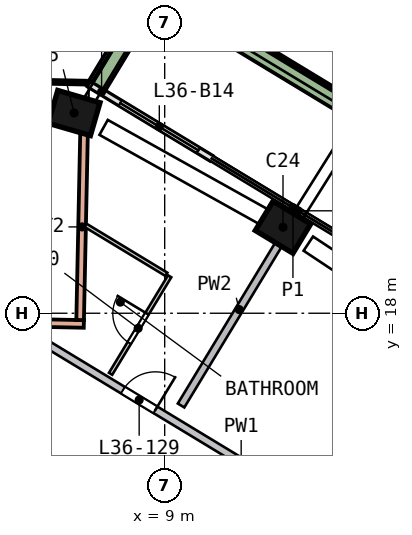
"""IFC4 building model, lengths in metres.
Left out: names, types, materials, properties, quantities, classifications, styles, units other than length and angle.
Written with IfcOpenShell. Run it as: python <this file> out.ifc"""

import sys

from ifc_helpers import new_model, si_unit, direction, frame, frame_2d, origin, origin_2d, place, context, subcontext, project, spatial, rectangle, extrude, element, fill, save


model = new_model("IFC4")
c1 = context("Model", 3, precision=1e-05, world=origin(), true_north=direction((0.0, 1.0)))
c2 = subcontext(c1, "Body", "Model", "MODEL_VIEW")
j1 = project(units=[si_unit("LENGTHUNIT", "METRE"), si_unit("PLANEANGLEUNIT", "RADIAN")], contexts=[c1])
p1 = place(None, origin())
s1 = spatial("IfcSite", under=j1, at=p1, CompositionType="ELEMENT")
p2 = place(p1, origin())
s2 = spatial("IfcBuilding", under=s1, at=p2, CompositionType="ELEMENT")
p3 = place(p2, frame((0.0, 0.0, 150.5)))
s3 = spatial("IfcBuildingStorey", under=s2, at=p3, CompositionType="ELEMENT", Elevation=150.5)
p4 = place(p3, frame((12.23, 20.194, 0.0), z_axis=(-0.096507973, 0.057418061, 0.993674684), x_axis=(-0.849621729, 0.515299129, -0.112293037)))
e1 = element("IfcColumn", 1, at=p4, inside=s3, PredefinedType="COLUMN", context=c2, shape_type="SweptSolid", body=[
    extrude(rectangle(XDim=1.15, YDim=0.9, at=origin_2d()), origin(), (0.0, 0.0, 1.0), 3.21),
])
p5 = place(p3, frame((6.75, 23.232, 0.0), z_axis=(-0.11077004, 0.031170704, 0.993357129), x_axis=(0.953900326, -0.277188554, 0.115068122)))
e2 = element("IfcColumn", 2, at=p5, inside=s3, PredefinedType="COLUMN", context=c2, shape_type="SweptSolid", body=[
    extrude(rectangle(XDim=1.15, YDim=0.9, at=origin_2d()), origin(), (0.0, 0.0, 1.0), 3.211),
])
p6 = place(p3, frame((10.227, 22.079, 0.0), z_axis=(0.0, 0.0, 1.0), x_axis=(-0.85536042, 0.51803335, 0.0)))
e3 = element("IfcWall", 3, at=p6, inside=s3, PredefinedType="SOLIDWALL", context=c2, shape_type="SweptSolid", body=[
    extrude(rectangle(XDim=3.75, YDim=0.15, at=frame_2d((1.875, 0.0))), origin(), (0.0, 0.0, 1.0), 2.475),
])
p7 = place(p6, frame((0.4, 0.0, 0.0)))
e4 = element("IfcOpeningElement", 4, at=p7, cuts=e3, PredefinedType="OPENING", context=c2, shape_type="SweptSolid", body=[
    extrude(rectangle(XDim=2.4, YDim=2.4, at=frame_2d((1.2, 1.2))), frame((0.0, 0.085, 0.0), z_axis=(0.0, -1.0, 0.0), x_axis=(1.0, 0.0, 0.0)), (0.0, 0.0, 1.0), 0.17),
])
p8 = place(p3, frame((20.273, 19.531, 0.0), z_axis=(0.0, 0.0, 1.0), x_axis=(-0.855368156, 0.518020576, 0.0)))
e5 = element("IfcWall", 5, at=p8, inside=s3, PredefinedType="SOLIDWALL", context=c2, shape_type="SweptSolid", body=[
    extrude(rectangle(XDim=13.724, YDim=0.5, at=frame_2d((6.862, 0.0))), origin(), (0.0, 0.0, 1.0), 0.7),
])
p9 = place(p3, frame((8.619, 26.297, 0.0), z_axis=(0.0, 0.0, 1.0), x_axis=(-0.518043081, -0.855354527, 0.0)))
e6 = element("IfcWall", 6, at=p9, inside=s3, PredefinedType="SOLIDWALL", context=c2, shape_type="SweptSolid", body=[
    extrude(rectangle(XDim=2.699, YDim=0.5, at=frame_2d((1.35, 0.0))), origin(), (0.0, 0.0, 1.0), 0.7),
])
p10 = place(p3, frame((-6.125, 17.99, 0.0), z_axis=(0.0, 0.0, 1.0), x_axis=(0.999780737, -0.020939881, 0.0)))
e7 = element("IfcWall", 7, at=p10, inside=s3, PredefinedType="SOLIDWALL", context=c2, shape_type="SweptSolid", body=[
    extrude(rectangle(XDim=13.0, YDim=0.2, at=frame_2d((6.5, 0.0))), origin(), (0.0, 0.0, 1.0), 3.19),
])
p11 = place(p10, frame((5.6, 0.0, 0.0)))
e8 = element("IfcOpeningElement", 8, at=p11, cuts=e7, PredefinedType="OPENING", context=c2, shape_type="SweptSolid", body=[
    extrude(rectangle(XDim=1.8, YDim=2.4, at=frame_2d((0.9, 1.2))), frame((0.0, 0.11, 0.0), z_axis=(0.0, -1.0, 0.0), x_axis=(1.0, 0.0, 0.0)), (0.0, 0.0, 1.0), 0.22),
])
p12 = place(p3, frame((6.877, 22.724, 0.0), z_axis=(0.0, 0.0, 1.0), x_axis=(-0.020957356, -0.99978037, 0.0)))
e9 = element("IfcWall", 9, at=p12, inside=s3, PredefinedType="SOLIDWALL", context=c2, shape_type="SweptSolid", body=[
    extrude(rectangle(XDim=4.904, YDim=0.2, at=frame_2d((2.452, 0.0))), origin(), (0.0, 0.0, 1.0), 3.19),
])
p13 = place(p3, frame((6.926, 24.069, 0.0), z_axis=(0.0, 0.0, 1.0), x_axis=(-0.999780849, 0.020934534, 0.0)))
e10 = element("IfcWall", 10, at=p13, inside=s3, PredefinedType="SOLIDWALL", context=c2, shape_type="SweptSolid", body=[
    extrude(rectangle(XDim=12.84, YDim=0.1, at=frame_2d((6.42, 0.0))), origin(), (0.0, 0.0, 1.0), 0.7),
])
p14 = place(p3, frame((5.112, 17.665, 0.0), z_axis=(0.0, 0.0, 1.0), x_axis=(0.855374458, -0.51801017, 0.0)))
e11 = element("IfcWall", 11, at=p14, inside=s3, PredefinedType="SOLIDWALL", context=c2, shape_type="SweptSolid", body=[
    extrude(rectangle(XDim=9.336, YDim=0.2, at=frame_2d((4.668, 0.0))), origin(), (0.0, 0.0, 1.0), 3.19),
])
p15 = place(p14, frame((3.26, 0.0, 0.0)))
e12 = element("IfcOpeningElement", 12, at=p15, cuts=e11, PredefinedType="OPENING", context=c2, shape_type="SweptSolid", body=[
    extrude(rectangle(XDim=1.0, YDim=2.1, at=frame_2d((0.5, 1.05))), frame((0.0, 0.11, 0.0), z_axis=(0.0, -1.0, 0.0), x_axis=(1.0, 0.0, 0.0)), (0.0, 0.0, 1.0), 0.22),
])
p16 = place(p3, frame((9.431, 15.573, 0.0), z_axis=(0.0, 0.0, 1.0), x_axis=(0.518049609, 0.855350573, 0.0)))
e13 = element("IfcWall", 13, at=p16, inside=s3, PredefinedType="SOLIDWALL", context=c2, shape_type="SweptSolid", body=[
    extrude(rectangle(XDim=5.903, YDim=0.2, at=frame_2d((2.951, 0.0))), origin(), (0.0, 0.0, 1.0), 3.19),
])
p17 = place(p3, frame((6.91, 20.318, 0.0), z_axis=(0.0, 0.0, 1.0), x_axis=(0.855354114, -0.518043762, 0.0)))
e14 = element("IfcWall", 14, at=p17, inside=s3, PredefinedType="PARTITIONING", context=c2, shape_type="SweptSolid", body=[
    extrude(rectangle(XDim=2.496, YDim=0.1, at=frame_2d((1.248, 0.0))), origin(), (0.0, 0.0, 1.0), 3.19),
])
p18 = place(p3, frame((7.576, 16.406, 0.0), z_axis=(0.0, 0.0, 1.0), x_axis=(0.518045593, 0.855353005, 0.0)))
e15 = element("IfcWall", 15, at=p18, inside=s3, PredefinedType="PARTITIONING", context=c2, shape_type="SweptSolid", body=[
    extrude(rectangle(XDim=3.0, YDim=0.1, at=frame_2d((1.5, 0.0))), origin(), (0.0, 0.0, 1.0), 3.19),
])
p19 = place(p18, frame((0.95, 0.0, 0.0)))
e16 = element("IfcOpeningElement", 16, at=p19, cuts=e15, PredefinedType="OPENING", context=c2, shape_type="SweptSolid", body=[
    extrude(rectangle(XDim=0.9, YDim=2.1, at=frame_2d((0.45, 1.05))), frame((0.0, 0.06, 0.0), z_axis=(0.0, -1.0, 0.0), x_axis=(1.0, 0.0, 0.0)), (0.0, 0.0, 1.0), 0.12),
])
p20 = place(p7, origin())
e17 = element("IfcDoor", 17, at=p20, inside=s3, OperationType="SLIDING_TO_RIGHT", PredefinedType="DOOR", context=c2, shape_type="SweptSolid", body=[
    extrude(rectangle(XDim=2.4, YDim=2.4, at=frame_2d((1.2, 1.2))), frame((0.0, 0.025, 0.0), z_axis=(0.0, -1.0, 0.0), x_axis=(1.0, 0.0, 0.0)), (0.0, 0.0, 1.0), 0.05),
])
fill(e4, e17)
p21 = place(p15, origin())
e18 = element("IfcDoor", 18, at=p21, inside=s3, OperationType="SINGLE_SWING_RIGHT", PredefinedType="DOOR", context=c2, shape_type="SweptSolid", body=[
    extrude(rectangle(XDim=1.0, YDim=2.1, at=frame_2d((0.5, 1.05))), frame((0.0, 0.025, 0.0), z_axis=(0.0, -1.0, 0.0), x_axis=(1.0, 0.0, 0.0)), (0.0, 0.0, 1.0), 0.05),
])
fill(e12, e18)
p22 = place(p19, origin())
e19 = element("IfcDoor", 19, at=p22, inside=s3, OperationType="SINGLE_SWING_RIGHT", PredefinedType="DOOR", context=c2, shape_type="SweptSolid", body=[
    extrude(rectangle(XDim=0.9, YDim=2.1, at=frame_2d((0.45, 1.05))), frame((0.0, 0.025, 0.0), z_axis=(0.0, -1.0, 0.0), x_axis=(1.0, 0.0, 0.0)), (0.0, 0.0, 1.0), 0.05),
])
fill(e16, e19)
save(model, sys.argv[1])
